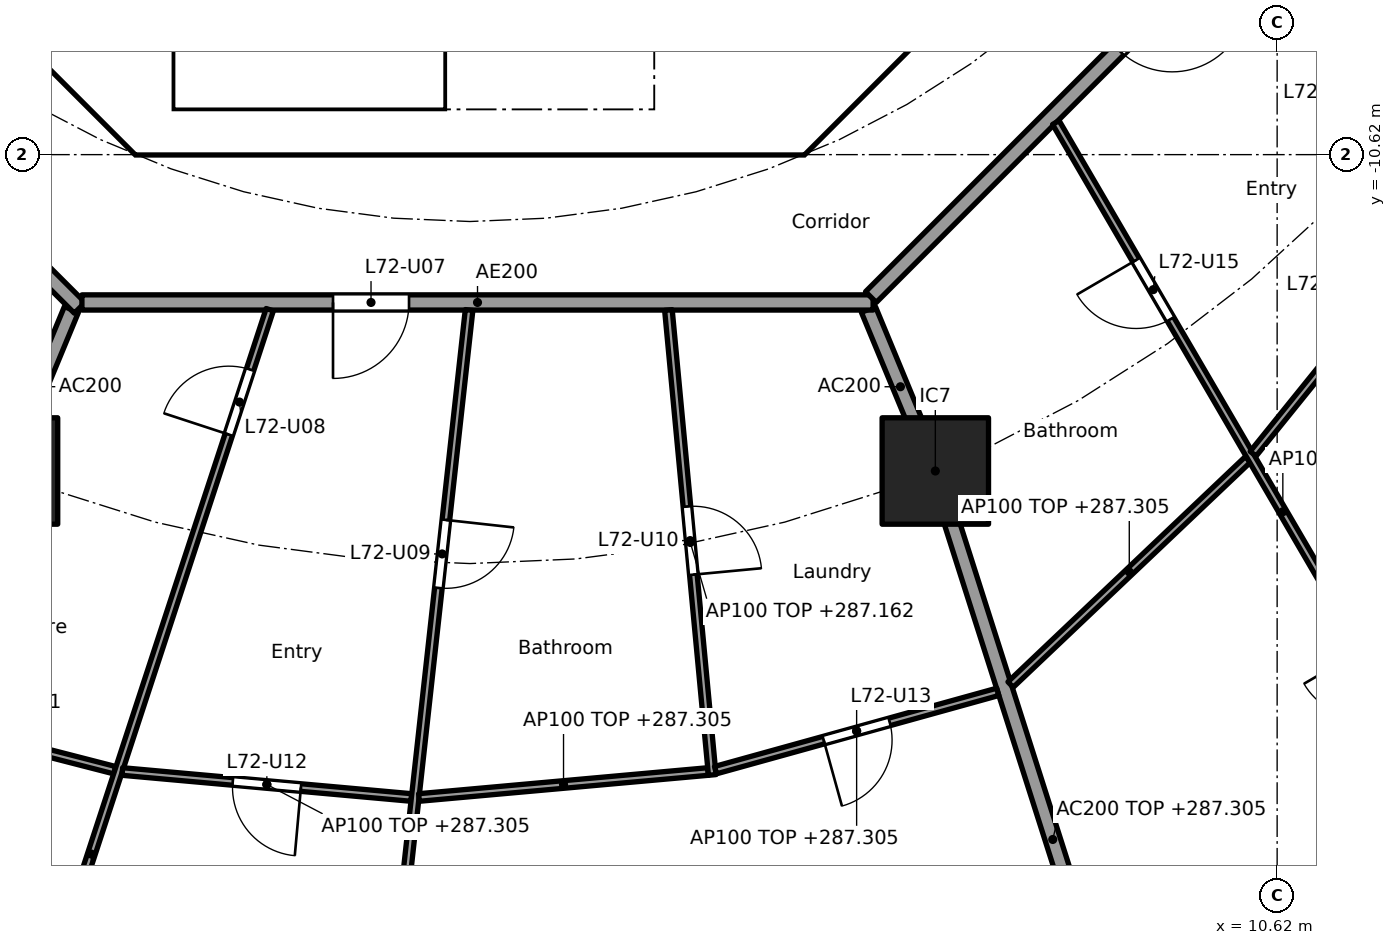
"""IFC4 building model, lengths in metres.
Left out: names, types, materials, properties, quantities, classifications, styles, units other than length and angle.
Written with IfcOpenShell. Run it as: python <this file> out.ifc"""

import sys

from ifc_helpers import new_model, si_unit, direction, frame, frame_2d, origin, origin_2d, place, context, subcontext, project, spatial, polyline, rectangle, outline, extrude, element, fill, save


model = new_model("IFC4")
c1 = context("Model", 3, precision=1e-05, world=origin(), true_north=direction((0.0, 1.0)))
c2 = subcontext(c1, "Body", "Model", "MODEL_VIEW")
j1 = project(units=[si_unit("LENGTHUNIT", "METRE"), si_unit("PLANEANGLEUNIT", "RADIAN")], contexts=[c1])
p1 = place(None, origin())
s1 = spatial("IfcSite", under=j1, at=p1, CompositionType="ELEMENT")
p2 = place(p1, origin())
s2 = spatial("IfcBuilding", under=s1, at=p2, CompositionType="ELEMENT")
p3 = place(p2, frame((0.0, 0.0, 284.4)))
s3 = spatial("IfcBuildingStorey", under=s2, at=p3, CompositionType="ELEMENT", Elevation=284.4)
for number, where, z_axis, x_axis in (
    (1, (-6.123, -14.782, 0.0), (0.0, 0.0, 1.0), (1.0, 0.0, 0.0)),
    (2, (6.123, -14.782, 0.0), (0.0, 0.0, 1.0), (1.0, 0.0, 0.0)),
):
    element("IfcColumn", number, at=place(p3, frame(where, z_axis=z_axis, x_axis=x_axis)), inside=s3, PredefinedType="COLUMN", context=c2, shape_type="SweptSolid", body=[
        extrude(rectangle(XDim=1.4, YDim=1.4, at=origin_2d()), origin(), (0.0, 0.0, 1.0), 3.7),
    ])
p4 = place(p3, frame((-9.988, -4.613, 0.0), z_axis=(0.0, 0.0, 1.0), x_axis=(0.707106781187, -0.707106781187, 0.0)))
e3 = element("IfcWall", 3, at=p4, inside=s3, PredefinedType="SHEAR", context=c2, shape_type="SweptSolid", body=[
    extrude(rectangle(XDim=7.602, YDim=0.6, at=frame_2d((3.801, 0.0))), origin(), (0.0, 0.0, 1.0), 3.44),
])
p5 = place(p4, frame((6.151, 0.0, 0.0)))
e4 = element("IfcOpeningElement", 4, at=p5, cuts=e3, PredefinedType="OPENING", context=c2, shape_type="SweptSolid", body=[
    extrude(rectangle(XDim=1.1, YDim=2.1, at=frame_2d((0.55, 1.05))), frame((0.0, 0.31, 0.0), z_axis=(0.0, -1.0, 0.0), x_axis=(1.0, 0.0, 0.0)), (0.0, 0.0, 1.0), 0.62),
])
p6 = place(p3, frame((4.613, -9.988, 0.0), z_axis=(0.0, 0.0, 1.0), x_axis=(0.707106781187, 0.707106781187, 0.0)))
e5 = element("IfcWall", 5, at=p6, inside=s3, PredefinedType="SHEAR", context=c2, shape_type="SweptSolid", body=[
    extrude(rectangle(XDim=7.602, YDim=0.6, at=frame_2d((3.801, 0.0))), origin(), (0.0, 0.0, 1.0), 3.44),
])
p7 = place(p6, frame((3.201, 0.0, 0.0)))
e6 = element("IfcOpeningElement", 6, at=p7, cuts=e5, PredefinedType="OPENING", context=c2, shape_type="SweptSolid", body=[
    extrude(rectangle(XDim=1.2, YDim=2.1, at=frame_2d((0.6, 1.05))), frame((0.0, 0.31, 0.0), z_axis=(0.0, -1.0, 0.0), x_axis=(1.0, 0.0, 0.0)), (0.0, 0.0, 1.0), 0.62),
])
p8 = place(p3, frame((4.0, -10.025, 0.0), z_axis=(0.0, 0.0, 1.0), x_axis=(0.0, 1.0, 0.0)))
e7 = element("IfcWall", 7, at=p8, inside=s3, PredefinedType="SOLIDWALL", context=c2, shape_type="SweptSolid", body=[
    extrude(rectangle(XDim=3.0, YDim=0.2, at=frame_2d((1.5, 0.0))), origin(), (0.0, 0.0, 1.0), 3.44),
])
p9 = place(p8, frame((0.975, 0.0, 0.0)))
e8 = element("IfcOpeningElement", 8, at=p9, cuts=e7, PredefinedType="OPENING", context=c2, shape_type="SweptSolid", body=[
    extrude(rectangle(XDim=1.1, YDim=2.1, at=frame_2d((0.55, 1.05))), frame((0.0, 0.11, 0.0), z_axis=(0.0, -1.0, 0.0), x_axis=(1.0, 0.0, 0.0)), (0.0, 0.0, 1.0), 0.22),
])
p10 = place(p3, origin())
e9 = element("IfcWall", 9, at=p10, inside=s3, PredefinedType="SHEAR", context=c2, shape_type="SweptSolid", body=[
    extrude(outline(polyline([(-4.152, -10.025), (4.152, -10.025), (4.401, -9.776), (4.825, -10.2), (4.401, -10.625), (-4.401, -10.625), (-4.825, -10.2), (-4.401, -9.776), (-4.152, -10.025)])), origin(), (0.0, 0.0, 1.0), 3.44),
])
p11 = place(p3, origin())
e10 = element("IfcWall", 10, at=p11, inside=s3, PredefinedType="SOLIDWALL", context=c2, shape_type="SweptSolid", body=[
    extrude(outline(polyline([(-3.9, -10.025), (-4.1, -10.025), (-4.1, -7.025), (-3.9, -7.025), (-3.9, -10.025)])), origin(), (0.0, 0.0, 1.0), 3.44),
])
p12 = place(p3, frame((-5.243, -12.657, 0.0), z_axis=(0.0, 0.0, 1.0), x_axis=(-0.382770106157, -0.923843626288, 0.0)))
e11 = element("IfcWall", 11, at=p12, inside=s3, PredefinedType="PARTITIONING", context=c2, shape_type="SweptSolid", body=[
    extrude(rectangle(XDim=2.199, YDim=0.2, at=frame_2d((1.1, 0.0))), origin(), (0.0, 0.0, 1.0), 3.44),
])
p13 = place(p3, frame((5.243, -12.657, 0.0), z_axis=(0.0, 0.0, 1.0), x_axis=(0.382707856524, -0.923869415315, 0.0)))
e12 = element("IfcWall", 12, at=p13, inside=s3, PredefinedType="PARTITIONING", context=c2, shape_type="SweptSolid", body=[
    extrude(rectangle(XDim=2.2, YDim=0.2, at=frame_2d((1.1, 0.0))), origin(), (0.0, 0.0, 1.0), 3.44),
])
p14 = place(p3, frame((6.138, -14.83, 0.0), z_axis=(0.0, 0.0, 1.0), x_axis=(0.303653679037, -0.952782474234, 0.0)))
e13 = element("IfcWall", 13, at=p14, inside=s3, PredefinedType="PARTITIONING", context=c2, shape_type="SweptSolid", body=[
    extrude(rectangle(XDim=10.076, YDim=0.2, at=frame_2d((5.038, 0.0))), origin(), (0.0, 0.0, 1.0), 2.905),
])
p15 = place(p3, frame((-12.635, -5.134, 0.0), z_axis=(0.0, 0.0, 1.0), x_axis=(0.707106781187, -0.707106781187, 0.0)))
e14 = element("IfcWall", 14, at=p15, inside=s3, PredefinedType="PARTITIONING", context=c2, shape_type="SweptSolid", body=[
    extrude(rectangle(XDim=10.609, YDim=0.2, at=frame_2d((5.305, 0.0))), origin(), (0.0, 0.0, 1.0), 3.44),
])
p16 = place(p15, frame((6.539, 0.0, 0.0)))
e15 = element("IfcOpeningElement", 15, at=p16, cuts=e14, PredefinedType="OPENING", context=c2, shape_type="SweptSolid", body=[
    extrude(rectangle(XDim=1.0, YDim=2.1, at=frame_2d((0.5, 1.05))), frame((0.0, 0.11, 0.0), z_axis=(0.0, -1.0, 0.0), x_axis=(1.0, 0.0, 0.0)), (0.0, 0.0, 1.0), 0.22),
])
p17 = place(p3, frame((-5.104, -12.565, 0.0), z_axis=(0.0, 0.0, 1.0), x_axis=(1.0, 0.0, 0.0)))
e16 = element("IfcWall", 16, at=p17, inside=s3, PredefinedType="PARTITIONING", context=c2, shape_type="SweptSolid", body=[
    extrude(rectangle(XDim=10.409, YDim=0.2, at=frame_2d((5.205, 0.0))), origin(), (0.0, 0.0, 1.0), 3.44),
])
p18 = place(p17, frame((3.303, 0.0, 0.0)))
e17 = element("IfcOpeningElement", 17, at=p18, cuts=e16, PredefinedType="OPENING", context=c2, shape_type="SweptSolid", body=[
    extrude(rectangle(XDim=1.0, YDim=2.1, at=frame_2d((0.5, 1.05))), frame((0.0, 0.11, 0.0), z_axis=(0.0, -1.0, 0.0), x_axis=(1.0, 0.0, 0.0)), (0.0, 0.0, 1.0), 0.22),
])
p19 = place(p3, frame((5.275, -12.494, 0.0), z_axis=(0.0, 0.0, 1.0), x_axis=(0.707106781187, 0.707106781187, 0.0)))
e18 = element("IfcWall", 18, at=p19, inside=s3, PredefinedType="PARTITIONING", context=c2, shape_type="SweptSolid", body=[
    extrude(rectangle(XDim=10.409, YDim=0.2, at=frame_2d((5.205, 0.0))), origin(), (0.0, 0.0, 1.0), 3.44),
])
p20 = place(p19, frame((4.604, 0.0, 0.0)))
e19 = element("IfcOpeningElement", 19, at=p20, cuts=e18, PredefinedType="OPENING", context=c2, shape_type="SweptSolid", body=[
    extrude(rectangle(XDim=1.0, YDim=2.1, at=frame_2d((0.5, 1.05))), frame((0.0, 0.11, 0.0), z_axis=(0.0, -1.0, 0.0), x_axis=(1.0, 0.0, 0.0)), (0.0, 0.0, 1.0), 0.22),
])
p21 = place(p3, frame((-8.03, -17.854, 0.0), z_axis=(0.0, 0.0, 1.0), x_axis=(0.968441967324, -0.249239154077, 0.0)))
e20 = element("IfcWall", 20, at=p21, inside=s3, PredefinedType="PARTITIONING", context=c2, shape_type="SweptSolid", body=[
    extrude(rectangle(XDim=3.468, YDim=0.1, at=frame_2d((1.734, 0.0))), origin(), (0.0, 0.0, 1.0), 2.905),
])
p22 = place(p21, frame((1.284, 0.0, 0.0)))
e21 = element("IfcOpeningElement", 21, at=p22, cuts=e20, PredefinedType="OPENING", context=c2, shape_type="SweptSolid", body=[
    extrude(rectangle(XDim=0.9, YDim=2.1, at=frame_2d((0.45, 1.05))), frame((0.0, 0.06, 0.0), z_axis=(0.0, -1.0, 0.0), x_axis=(1.0, 0.0, 0.0)), (0.0, 0.0, 1.0), 0.12),
])
p23 = place(p3, frame((-2.633, -12.66, 0.0), z_axis=(0.0, 0.0, 1.0), x_axis=(-0.311432955908, -0.950268127412, 0.0)))
e22 = element("IfcWall", 22, at=p23, inside=s3, PredefinedType="PARTITIONING", context=c2, shape_type="SweptSolid", body=[
    extrude(rectangle(XDim=15.074, YDim=0.1, at=frame_2d((7.537, 0.0))), origin(), (0.0, 0.0, 1.0), 2.762),
])
p24 = place(p23, frame((0.829, 0.0, 0.0)))
e23 = element("IfcOpeningElement", 23, at=p24, cuts=e22, PredefinedType="OPENING", context=c2, shape_type="SweptSolid", body=[
    extrude(rectangle(XDim=0.9, YDim=2.1, at=frame_2d((0.45, 1.05))), frame((0.0, 0.06, 0.0), z_axis=(0.0, -1.0, 0.0), x_axis=(1.0, 0.0, 0.0)), (0.0, 0.0, 1.0), 0.12),
])
p25 = place(p3, frame((-4.573, -18.736, 0.0), z_axis=(0.0, 0.0, 1.0), x_axis=(0.995986472869, -0.089503887414, 0.0)))
e24 = element("IfcWall", 24, at=p25, inside=s3, PredefinedType="PARTITIONING", context=c2, shape_type="SweptSolid", body=[
    extrude(rectangle(XDim=3.819, YDim=0.1, at=frame_2d((1.909, 0.0))), origin(), (0.0, 0.0, 1.0), 2.905),
])
p26 = place(p25, frame((1.459, 0.0, 0.0)))
e25 = element("IfcOpeningElement", 25, at=p26, cuts=e24, PredefinedType="OPENING", context=c2, shape_type="SweptSolid", body=[
    extrude(rectangle(XDim=0.9, YDim=2.1, at=frame_2d((0.45, 1.05))), frame((0.0, 0.06, 0.0), z_axis=(0.0, -1.0, 0.0), x_axis=(1.0, 0.0, 0.0)), (0.0, 0.0, 1.0), 0.12),
])
p27 = place(p3, frame((-0.011, -12.664, 0.0), z_axis=(0.0, 0.0, 1.0), x_axis=(-0.109805889692, -0.993953050495, 0.0)))
e26 = element("IfcWall", 26, at=p27, inside=s3, PredefinedType="PARTITIONING", context=c2, shape_type="SweptSolid", body=[
    extrude(rectangle(XDim=15.248, YDim=0.1, at=frame_2d((7.624, 0.0))), origin(), (0.0, 0.0, 1.0), 2.762),
])
p28 = place(p27, frame((2.778, 0.0, 0.0)))
e27 = element("IfcOpeningElement", 27, at=p28, cuts=e26, PredefinedType="OPENING", context=c2, shape_type="SweptSolid", body=[
    extrude(rectangle(XDim=0.9, YDim=2.1, at=frame_2d((0.45, 1.05))), frame((0.0, 0.06, 0.0), z_axis=(0.0, -1.0, 0.0), x_axis=(1.0, 0.0, 0.0)), (0.0, 0.0, 1.0), 0.12),
])
p29 = place(p3, frame((-0.67, -19.077, 0.0), z_axis=(0.0, 0.0, 1.0), x_axis=(0.995986472869, 0.089503887414, 0.0)))
e28 = element("IfcWall", 28, at=p29, inside=s3, PredefinedType="PARTITIONING", context=c2, shape_type="SweptSolid", body=[
    extrude(rectangle(XDim=3.819, YDim=0.1, at=frame_2d((1.909, 0.0))), origin(), (0.0, 0.0, 1.0), 2.905),
])
p30 = place(p3, frame((2.612, -12.664, 0.0), z_axis=(0.0, 0.0, 1.0), x_axis=(0.093781393779, -0.995592813444, 0.0)))
e29 = element("IfcWall", 29, at=p30, inside=s3, PredefinedType="PARTITIONING", context=c2, shape_type="SweptSolid", body=[
    extrude(rectangle(XDim=6.144, YDim=0.1, at=frame_2d((3.072, 0.0))), origin(), (0.0, 0.0, 1.0), 2.762),
])
p31 = place(p30, frame((2.597, 0.0, 0.0)))
e30 = element("IfcOpeningElement", 30, at=p31, cuts=e29, PredefinedType="OPENING", context=c2, shape_type="SweptSolid", body=[
    extrude(rectangle(XDim=0.9, YDim=2.1, at=frame_2d((0.45, 1.05))), frame((0.0, 0.06, 0.0), z_axis=(0.0, -1.0, 0.0), x_axis=(1.0, 0.0, 0.0)), (0.0, 0.0, 1.0), 0.12),
])
p32 = place(p3, frame((3.231, -18.718, 0.0), z_axis=(0.0, 0.0, 1.0), x_axis=(0.963606817151, 0.267323590318, 0.0)))
e31 = element("IfcWall", 31, at=p32, inside=s3, PredefinedType="PARTITIONING", context=c2, shape_type="SweptSolid", body=[
    extrude(rectangle(XDim=3.853, YDim=0.1, at=frame_2d((1.927, 0.0))), origin(), (0.0, 0.0, 1.0), 2.905),
])
p33 = place(p32, frame((1.477, 0.0, 0.0)))
e32 = element("IfcOpeningElement", 32, at=p33, cuts=e31, PredefinedType="OPENING", context=c2, shape_type="SweptSolid", body=[
    extrude(rectangle(XDim=0.9, YDim=2.1, at=frame_2d((0.45, 1.05))), frame((0.0, 0.06, 0.0), z_axis=(0.0, -1.0, 0.0), x_axis=(1.0, 0.0, 0.0)), (0.0, 0.0, 1.0), 0.12),
])
p34 = place(p3, frame((7.113, -17.592, 0.0), z_axis=(0.0, 0.0, 1.0), x_axis=(0.725433932329, 0.688291805723, 0.0)))
e33 = element("IfcWall", 33, at=p34, inside=s3, PredefinedType="PARTITIONING", context=c2, shape_type="SweptSolid", body=[
    extrude(rectangle(XDim=4.305, YDim=0.1, at=frame_2d((2.153, 0.0))), origin(), (0.0, 0.0, 1.0), 2.905),
])
p35 = place(p3, frame((7.708, -10.198, 0.0), z_axis=(0.0, 0.0, 1.0), x_axis=(0.503839015963, -0.863797572347, 0.0)))
e34 = element("IfcWall", 34, at=p35, inside=s3, PredefinedType="PARTITIONING", context=c2, shape_type="SweptSolid", body=[
    extrude(rectangle(XDim=11.856, YDim=0.1, at=frame_2d((5.928, 0.0))), origin(), (0.0, 0.0, 1.0), 2.762),
])
p36 = place(p35, frame((2.095, 0.0, 0.0)))
e35 = element("IfcOpeningElement", 35, at=p36, cuts=e34, PredefinedType="OPENING", context=c2, shape_type="SweptSolid", body=[
    extrude(rectangle(XDim=0.9, YDim=2.1, at=frame_2d((0.45, 1.05))), frame((0.0, 0.06, 0.0), z_axis=(0.0, -1.0, 0.0), x_axis=(1.0, 0.0, 0.0)), (0.0, 0.0, 1.0), 0.12),
])
p37 = place(p35, frame((8.023, 0.0, 0.0)))
e36 = element("IfcOpeningElement", 36, at=p37, cuts=e34, PredefinedType="OPENING", context=c2, shape_type="SweptSolid", body=[
    extrude(rectangle(XDim=0.9, YDim=2.1, at=frame_2d((0.45, 1.05))), frame((0.0, 0.06, 0.0), z_axis=(0.0, -1.0, 0.0), x_axis=(1.0, 0.0, 0.0)), (0.0, 0.0, 1.0), 0.12),
])
p38 = place(p3, frame((10.304, -14.555, 0.0), z_axis=(0.0, 0.0, 1.0), x_axis=(0.628170338674, 0.778075848237, 0.0)))
e37 = element("IfcWall", 37, at=p38, inside=s3, PredefinedType="PARTITIONING", context=c2, shape_type="SweptSolid", body=[
    extrude(rectangle(XDim=4.532, YDim=0.1, at=frame_2d((2.266, 0.0))), origin(), (0.0, 0.0, 1.0), 2.905),
])
p39 = place(p38, frame((1.816, 0.0, 0.0)))
e38 = element("IfcOpeningElement", 38, at=p39, cuts=e37, PredefinedType="OPENING", context=c2, shape_type="SweptSolid", body=[
    extrude(rectangle(XDim=0.9, YDim=2.1, at=frame_2d((0.45, 1.05))), frame((0.0, 0.06, 0.0), z_axis=(0.0, -1.0, 0.0), x_axis=(1.0, 0.0, 0.0)), (0.0, 0.0, 1.0), 0.12),
])
p40 = place(p3, frame((10.179, -7.731, 0.0), z_axis=(0.0, 0.0, 1.0), x_axis=(0.67775318564, -0.73528947997, 0.0)))
e39 = element("IfcWall", 39, at=p40, inside=s3, PredefinedType="PARTITIONING", context=c2, shape_type="SweptSolid", body=[
    extrude(rectangle(XDim=10.222, YDim=0.1, at=frame_2d((5.111, 0.0))), origin(), (0.0, 0.0, 1.0), 2.762),
])
p41 = place(p40, frame((1.766, 0.0, 0.0)))
e40 = element("IfcOpeningElement", 40, at=p41, cuts=e39, PredefinedType="OPENING", context=c2, shape_type="SweptSolid", body=[
    extrude(rectangle(XDim=0.9, YDim=2.1, at=frame_2d((0.45, 1.05))), frame((0.0, 0.06, 0.0), z_axis=(0.0, -1.0, 0.0), x_axis=(1.0, 0.0, 0.0)), (0.0, 0.0, 1.0), 0.12),
])
p42 = place(p40, frame((6.877, 0.0, 0.0)))
e41 = element("IfcOpeningElement", 41, at=p42, cuts=e39, PredefinedType="OPENING", context=c2, shape_type="SweptSolid", body=[
    extrude(rectangle(XDim=0.9, YDim=2.1, at=frame_2d((0.45, 1.05))), frame((0.0, 0.06, 0.0), z_axis=(0.0, -1.0, 0.0), x_axis=(1.0, 0.0, 0.0)), (0.0, 0.0, 1.0), 0.12),
])
p43 = place(p5, origin())
e42 = element("IfcDoor", 42, at=p43, inside=s3, OperationType="SINGLE_SWING_LEFT", PredefinedType="DOOR", context=c2, shape_type="SweptSolid", body=[
    extrude(rectangle(XDim=1.1, YDim=2.1, at=frame_2d((0.55, 1.05))), frame((0.0, 0.025, 0.0), z_axis=(0.0, -1.0, 0.0), x_axis=(1.0, 0.0, 0.0)), (0.0, 0.0, 1.0), 0.05),
])
fill(e4, e42)
p44 = place(p18, frame((1.0, 0.0, 0.0), x_axis=(-1.0, 0.0, 0.0)))
e43 = element("IfcDoor", 43, at=p44, inside=s3, OperationType="SINGLE_SWING_RIGHT", PredefinedType="DOOR", context=c2, shape_type="SweptSolid", body=[
    extrude(rectangle(XDim=1.0, YDim=2.1, at=frame_2d((0.5, 1.05))), frame((0.0, 0.025, 0.0), z_axis=(0.0, -1.0, 0.0), x_axis=(1.0, 0.0, 0.0)), (0.0, 0.0, 1.0), 0.05),
])
fill(e17, e43)
p45 = place(p24, frame((0.9, 0.0, 0.0), x_axis=(-1.0, 0.0, 0.0)))
e44 = element("IfcDoor", 44, at=p45, inside=s3, OperationType="SINGLE_SWING_LEFT", PredefinedType="DOOR", context=c2, shape_type="SweptSolid", body=[
    extrude(rectangle(XDim=0.9, YDim=2.1, at=frame_2d((0.45, 1.05))), frame((0.0, 0.025, 0.0), z_axis=(0.0, -1.0, 0.0), x_axis=(1.0, 0.0, 0.0)), (0.0, 0.0, 1.0), 0.05),
])
fill(e23, e44)
p46 = place(p28, origin())
e45 = element("IfcDoor", 45, at=p46, inside=s3, OperationType="SINGLE_SWING_LEFT", PredefinedType="DOOR", context=c2, shape_type="SweptSolid", body=[
    extrude(rectangle(XDim=0.9, YDim=2.1, at=frame_2d((0.45, 1.05))), frame((0.0, 0.025, 0.0), z_axis=(0.0, -1.0, 0.0), x_axis=(1.0, 0.0, 0.0)), (0.0, 0.0, 1.0), 0.05),
])
fill(e27, e45)
p47 = place(p31, origin())
e46 = element("IfcDoor", 46, at=p47, inside=s3, OperationType="SINGLE_SWING_RIGHT", PredefinedType="DOOR", context=c2, shape_type="SweptSolid", body=[
    extrude(rectangle(XDim=0.9, YDim=2.1, at=frame_2d((0.45, 1.05))), frame((0.0, 0.025, 0.0), z_axis=(0.0, -1.0, 0.0), x_axis=(1.0, 0.0, 0.0)), (0.0, 0.0, 1.0), 0.05),
])
fill(e30, e46)
p48 = place(p26, frame((0.9, 0.0, 0.0), x_axis=(-1.0, 0.0, 0.0)))
e47 = element("IfcDoor", 47, at=p48, inside=s3, OperationType="SINGLE_SWING_LEFT", PredefinedType="DOOR", context=c2, shape_type="SweptSolid", body=[
    extrude(rectangle(XDim=0.9, YDim=2.1, at=frame_2d((0.45, 1.05))), frame((0.0, 0.025, 0.0), z_axis=(0.0, -1.0, 0.0), x_axis=(1.0, 0.0, 0.0)), (0.0, 0.0, 1.0), 0.05),
])
fill(e25, e47)
p49 = place(p33, frame((0.9, 0.0, 0.0), x_axis=(-1.0, 0.0, 0.0)))
e48 = element("IfcDoor", 48, at=p49, inside=s3, OperationType="SINGLE_SWING_RIGHT", PredefinedType="DOOR", context=c2, shape_type="SweptSolid", body=[
    extrude(rectangle(XDim=0.9, YDim=2.1, at=frame_2d((0.45, 1.05))), frame((0.0, 0.025, 0.0), z_axis=(0.0, -1.0, 0.0), x_axis=(1.0, 0.0, 0.0)), (0.0, 0.0, 1.0), 0.05),
])
fill(e32, e48)
p50 = place(p36, frame((0.9, 0.0, 0.0), x_axis=(-1.0, 0.0, 0.0)))
e49 = element("IfcDoor", 49, at=p50, inside=s3, OperationType="SINGLE_SWING_RIGHT", PredefinedType="DOOR", context=c2, shape_type="SweptSolid", body=[
    extrude(rectangle(XDim=0.9, YDim=2.1, at=frame_2d((0.45, 1.05))), frame((0.0, 0.025, 0.0), z_axis=(0.0, -1.0, 0.0), x_axis=(1.0, 0.0, 0.0)), (0.0, 0.0, 1.0), 0.05),
])
fill(e35, e49)
save(model, sys.argv[1])
